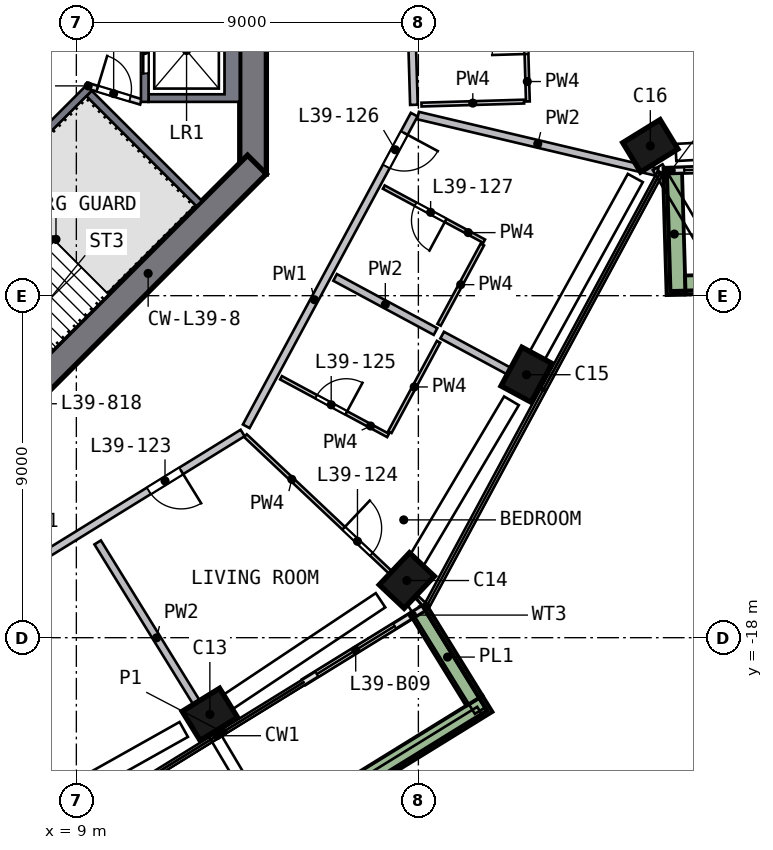
"""IFC4 building model, lengths in metres.
Left out: names, types, materials, properties, quantities, classifications, styles, units other than length and angle.
Written with IfcOpenShell. Run it as: python <this file> out.ifc"""

import sys

from ifc_helpers import new_model, si_unit, direction, frame, frame_2d, origin, origin_2d, place, context, subcontext, project, spatial, polyline, rectangle, outline, extrude, element, fill, save


model = new_model("IFC4")
c1 = context("Model", 3, precision=1e-05, world=origin(), true_north=direction((0.0, 1.0)))
c2 = subcontext(c1, "Body", "Model", "MODEL_VIEW")
j1 = project(units=[si_unit("LENGTHUNIT", "METRE"), si_unit("PLANEANGLEUNIT", "RADIAN")], contexts=[c1])
p1 = place(None, origin())
s1 = spatial("IfcSite", under=j1, at=p1, CompositionType="ELEMENT")
p2 = place(p1, origin())
s2 = spatial("IfcBuilding", under=s1, at=p2, CompositionType="ELEMENT")
p3 = place(p2, frame((0.0, 0.0, 162.0)))
s3 = spatial("IfcBuildingStorey", under=s2, at=p3, CompositionType="ELEMENT", Elevation=162.0)
p4 = place(p3, frame((12.398, -20.091, 0.0), z_axis=(0.09506304, 0.059775639, 0.993674943), x_axis=(0.845653201, 0.521786787, -0.112290748)))
e1 = element("IfcColumn", 1, at=p4, inside=s3, PredefinedType="COLUMN", context=c2, shape_type="SweptSolid", body=[
    extrude(rectangle(XDim=1.15, YDim=0.9, at=origin_2d()), origin(), (0.0, 0.0, 1.0), 3.21),
])
p5 = place(p3, frame((17.601, -16.598, 0.0), z_axis=(0.078230867, 0.084388982, 0.993357152), x_axis=(-0.681487218, -0.722727157, 0.115067924)))
e2 = element("IfcColumn", 2, at=p5, inside=s3, PredefinedType="COLUMN", context=c2, shape_type="SweptSolid", body=[
    extrude(rectangle(XDim=1.15, YDim=0.9, at=origin_2d()), origin(), (0.0, 0.0, 1.0), 3.211),
])
p6 = place(p3, frame((20.783, -11.2, 0.0), z_axis=(0.052474579, 0.09932145, 0.993670805), x_axis=(0.471622943, 0.874616696, -0.112327356)))
e3 = element("IfcColumn", 3, at=p6, inside=s3, PredefinedType="COLUMN", context=c2, shape_type="SweptSolid", body=[
    extrude(rectangle(XDim=1.15, YDim=0.9, at=origin_2d()), origin(), (0.0, 0.0, 1.0), 3.21),
])
p7 = place(p3, frame((24.075, -5.196, 0.0), z_axis=(0.023714632, 0.114620722, 0.993126229), x_axis=(-0.851746112, -0.517795924, 0.080099574)))
e4 = element("IfcColumn", 4, at=p7, inside=s3, PredefinedType="COLUMN", context=c2, shape_type="SweptSolid", body=[
    extrude(rectangle(XDim=1.15, YDim=0.9, at=origin_2d()), origin(), (0.0, 0.0, 1.0), 3.212),
])
p8 = place(p3, frame((13.65, -5.799, 0.0), z_axis=(0.0, 0.0, 1.0), x_axis=(0.0, 1.0, 0.0)))
e5 = element("IfcWall", 5, at=p8, inside=s3, PredefinedType="SHEAR", context=c2, shape_type="SweptSolid", body=[
    extrude(rectangle(XDim=11.598, YDim=0.7, at=frame_2d((5.799, 0.0))), origin(), (0.0, 0.0, 1.0), 3.5),
])
p9 = place(p8, frame((4.899, 0.0, 0.0)))
e6 = element("IfcOpeningElement", 6, at=p9, cuts=e5, PredefinedType="OPENING", context=c2, shape_type="SweptSolid", body=[
    extrude(rectangle(XDim=1.8, YDim=2.1, at=frame_2d((0.9, 1.05))), frame((0.0, 0.36, 0.0), z_axis=(0.0, -1.0, 0.0), x_axis=(1.0, 0.0, 0.0)), (0.0, 0.0, 1.0), 0.72),
])
p10 = place(p3, frame((5.552, -13.752, 0.0), z_axis=(0.0, 0.0, 1.0), x_axis=(0.707106781, 0.707106781, 0.0)))
e7 = element("IfcWall", 7, at=p10, inside=s3, PredefinedType="SHEAR", context=c2, shape_type="SweptSolid", body=[
    extrude(rectangle(XDim=11.598, YDim=0.7, at=frame_2d((5.799, 0.0))), origin(), (0.0, 0.0, 1.0), 3.5),
])
p11 = place(p10, frame((2.099, 0.0, 0.0)))
e8 = element("IfcOpeningElement", 8, at=p11, cuts=e7, PredefinedType="OPENING", context=c2, shape_type="SweptSolid", body=[
    extrude(rectangle(XDim=1.2, YDim=2.1, at=frame_2d((0.6, 1.05))), frame((0.0, 0.36, 0.0), z_axis=(0.0, -1.0, 0.0), x_axis=(1.0, 0.0, 0.0)), (0.0, 0.0, 1.0), 0.72),
])
p12 = place(p3, frame((14.989, -19.167, 0.0), z_axis=(0.0, 0.0, 1.0), x_axis=(0.851004729, 0.525158025, 0.0)))
e9 = element("IfcWall", 9, at=p12, inside=s3, PredefinedType="SOLIDWALL", context=c2, shape_type="SweptSolid", body=[
    extrude(rectangle(XDim=3.71, YDim=0.15, at=frame_2d((1.855, 0.0))), origin(), (0.0, 0.0, 1.0), 2.475),
])
p13 = place(p12, frame((0.4, 0.0, 0.0)))
e10 = element("IfcOpeningElement", 10, at=p13, cuts=e9, PredefinedType="OPENING", context=c2, shape_type="SweptSolid", body=[
    extrude(rectangle(XDim=2.4, YDim=2.4, at=frame_2d((1.2, 1.2))), frame((0.0, 0.085, 0.0), z_axis=(0.0, -1.0, 0.0), x_axis=(1.0, 0.0, 0.0)), (0.0, 0.0, 1.0), 0.17),
])
p14 = place(p3, frame((24.506, -5.709, 0.0), z_axis=(0.0, 0.0, 1.0), x_axis=(0.999571362, 0.029276149, 0.0)))
e11 = element("IfcWall", 11, at=p14, inside=s3, PredefinedType="SOLIDWALL", context=c2, shape_type="SweptSolid", body=[
    extrude(rectangle(XDim=2.393, YDim=0.15, at=frame_2d((1.197, 0.0))), origin(), (0.0, 0.0, 1.0), 2.475),
])
p15 = place(p14, frame((0.494, 0.0, 0.0)))
e12 = element("IfcOpeningElement", 12, at=p15, cuts=e11, PredefinedType="OPENING", context=c2, shape_type="SweptSolid", body=[
    extrude(rectangle(XDim=1.5, YDim=2.4, at=frame_2d((0.75, 1.2))), frame((0.0, 0.085, 0.0), z_axis=(0.0, -1.0, 0.0), x_axis=(1.0, 0.0, 0.0)), (0.0, 0.0, 1.0), 0.17),
])
p16 = place(p3, frame((8.142, -26.948, 0.0), z_axis=(0.0, 0.0, 1.0), x_axis=(0.85099, 0.525181892, 0.0)))
e13 = element("IfcWall", 13, at=p16, inside=s3, PredefinedType="SOLIDWALL", context=c2, shape_type="SweptSolid", body=[
    extrude(rectangle(XDim=13.723, YDim=0.5, at=frame_2d((6.862, 0.0))), origin(), (0.0, 0.0, 1.0), 0.7),
])
p17 = place(p3, frame((19.477, -19.659, 0.0), z_axis=(0.0, 0.0, 1.0), x_axis=(-0.525217448, 0.850968056, 0.0)))
e14 = element("IfcWall", 14, at=p17, inside=s3, PredefinedType="SOLIDWALL", context=c2, shape_type="SweptSolid", body=[
    extrude(rectangle(XDim=2.699, YDim=0.5, at=frame_2d((1.349, 0.0))), origin(), (0.0, 0.0, 1.0), 0.7),
])
p18 = place(p3, frame((24.688, -5.78, 0.0), z_axis=(0.0, 0.0, 1.0), x_axis=(0.029307097, -0.999570455, 0.0)))
e15 = element("IfcWall", 15, at=p18, inside=s3, PredefinedType="SOLIDWALL", context=c2, shape_type="SweptSolid", body=[
    extrude(rectangle(XDim=3.199, YDim=0.5, at=frame_2d((1.6, 0.0))), origin(), (0.0, 0.0, 1.0), 0.7),
])
p19 = place(p3, frame((25.025, -8.72, 0.0), z_axis=(0.0, 0.0, 1.0), x_axis=(0.999571841, 0.029259769, 0.0)))
e16 = element("IfcWall", 16, at=p19, inside=s3, PredefinedType="SOLIDWALL", context=c2, shape_type="SweptSolid", body=[
    extrude(rectangle(XDim=3.863, YDim=0.5, at=frame_2d((1.932, 0.0))), origin(), (0.0, 0.0, 1.0), 0.7),
])
p20 = place(p3, origin())
e17 = element("IfcWall", 17, at=p20, inside=s3, PredefinedType="SOLIDWALL", context=c2, shape_type="SweptSolid", body=[
    extrude(outline(polyline([(13.3, -3.9), (10.9, -3.9), (10.9, -3.7), (12.9, -3.7), (12.9, -1.4), (10.9, -1.4), (10.9, -1.2), (13.3, -1.2), (13.3, -3.9)])), origin(), (0.0, 0.0, 1.0), 3.19),
])
p21 = place(p3, frame((10.8, -1.2, 0.0), z_axis=(0.0, 0.0, 1.0), x_axis=(0.0, -1.0, 0.0)))
e18 = element("IfcWall", 18, at=p21, inside=s3, PredefinedType="SOLIDWALL", context=c2, shape_type="SweptSolid", body=[
    extrude(rectangle(XDim=2.7, YDim=0.2, at=frame_2d((1.35, 0.0))), origin(), (0.0, 0.0, 1.0), 3.19),
])
p22 = place(p21, frame((0.75, 0.0, 0.0)))
e19 = element("IfcOpeningElement", 19, at=p22, cuts=e18, PredefinedType="OPENING", context=c2, shape_type="SweptSolid", body=[
    extrude(rectangle(XDim=1.2, YDim=2.1, at=frame_2d((0.6, 1.05))), frame((0.0, 0.11, 0.0), z_axis=(0.0, -1.0, 0.0), x_axis=(1.0, 0.0, 0.0)), (0.0, 0.0, 1.0), 0.22),
])
p23 = place(p3, frame((9.334, -3.535, 0.0), z_axis=(0.0, 0.0, 1.0), x_axis=(-0.707106781, -0.707106781, 0.0)))
e20 = element("IfcWall", 20, at=p23, inside=s3, PredefinedType="SOLIDWALL", context=c2, shape_type="SweptSolid", body=[
    extrude(rectangle(XDim=8.2, YDim=0.2, at=frame_2d((4.1, 0.0))), origin(), (0.0, 0.0, 1.0), 3.19),
])
p24 = place(p23, frame((6.6, 0.0, 0.0)))
e21 = element("IfcOpeningElement", 21, at=p24, cuts=e20, PredefinedType="OPENING", context=c2, shape_type="SweptSolid", body=[
    extrude(rectangle(XDim=1.2, YDim=2.1, at=frame_2d((0.6, 1.05))), frame((0.0, 0.11, 0.0), z_axis=(0.0, -1.0, 0.0), x_axis=(1.0, 0.0, 0.0)), (0.0, 0.0, 1.0), 0.22),
])
p25 = place(p3, frame((9.334, -3.677, 0.0), z_axis=(0.0, 0.0, 1.0), x_axis=(0.707106781, -0.707106781, 0.0)))
e22 = element("IfcWall", 22, at=p25, inside=s3, PredefinedType="SOLIDWALL", context=c2, shape_type="SweptSolid", body=[
    extrude(rectangle(XDim=4.1, YDim=0.2, at=frame_2d((2.05, 0.0))), origin(), (0.0, 0.0, 1.0), 3.19),
])
p26 = place(p3, frame((9.263, -3.465, 0.0), z_axis=(0.0, 0.0, 1.0), x_axis=(0.957084567, -0.289808785, 0.0)))
e23 = element("IfcWall", 23, at=p26, inside=s3, PredefinedType="PARTITIONING", context=c2, shape_type="SweptSolid", body=[
    extrude(rectangle(XDim=1.501, YDim=0.15, at=frame_2d((0.75, 0.0))), origin(), (0.0, 0.0, 1.0), 3.19),
])
p27 = place(p26, frame((0.301, 0.0, 0.0)))
e24 = element("IfcOpeningElement", 24, at=p27, cuts=e23, PredefinedType="OPENING", context=c2, shape_type="SweptSolid", body=[
    extrude(rectangle(XDim=0.9, YDim=2.1, at=frame_2d((0.45, 1.05))), frame((0.0, 0.085, 0.0), z_axis=(0.0, -1.0, 0.0), x_axis=(1.0, 0.0, 0.0)), (0.0, 0.0, 1.0), 0.17),
])
p28 = place(p3, frame((13.375, -12.613, 0.0), z_axis=(0.0, 0.0, 1.0), x_axis=(-0.850995395, -0.52517315, 0.0)))
e25 = element("IfcWall", 25, at=p28, inside=s3, PredefinedType="SOLIDWALL", context=c2, shape_type="SweptSolid", body=[
    extrude(rectangle(XDim=9.316, YDim=0.2, at=frame_2d((4.658, 0.0))), origin(), (0.0, 0.0, 1.0), 3.19),
])
p29 = place(p28, frame((1.9, 0.0, 0.0)))
e26 = element("IfcOpeningElement", 26, at=p29, cuts=e25, PredefinedType="OPENING", context=c2, shape_type="SweptSolid", body=[
    extrude(rectangle(XDim=1.0, YDim=2.1, at=frame_2d((0.5, 1.05))), frame((0.0, 0.11, 0.0), z_axis=(0.0, -1.0, 0.0), x_axis=(1.0, 0.0, 0.0)), (0.0, 0.0, 1.0), 0.22),
])
p30 = place(p3, frame((17.89, -4.236, 0.0), z_axis=(0.0, 0.0, 1.0), x_axis=(-0.47438264, -0.880318755, 0.0)))
e27 = element("IfcWall", 27, at=p30, inside=s3, PredefinedType="SOLIDWALL", context=c2, shape_type="SweptSolid", body=[
    extrude(rectangle(XDim=9.317, YDim=0.2, at=frame_2d((4.658, 0.0))), origin(), (0.0, 0.0, 1.0), 3.19),
])
p31 = place(p30, frame((0.55, 0.0, 0.0)))
e28 = element("IfcOpeningElement", 28, at=p31, cuts=e27, PredefinedType="OPENING", context=c2, shape_type="SweptSolid", body=[
    extrude(rectangle(XDim=1.0, YDim=2.1, at=frame_2d((0.5, 1.05))), frame((0.0, 0.11, 0.0), z_axis=(0.0, -1.0, 0.0), x_axis=(1.0, 0.0, 0.0)), (0.0, 0.0, 1.0), 0.22),
])
p32 = place(p3, frame((17.883, -3.977, 0.0), z_axis=(0.0, 0.0, 1.0), x_axis=(-0.029297763, 0.999570728, 0.0)))
e29 = element("IfcWall", 29, at=p32, inside=s3, PredefinedType="SOLIDWALL", context=c2, shape_type="SweptSolid", body=[
    extrude(rectangle(XDim=3.4, YDim=0.2, at=frame_2d((1.7, 0.0))), origin(), (0.0, 0.0, 1.0), 3.19),
])
p33 = place(p3, frame((9.561, -15.493, 0.0), z_axis=(0.0, 0.0, 1.0), x_axis=(0.525190818, -0.850984492, 0.0)))
e30 = element("IfcWall", 30, at=p33, inside=s3, PredefinedType="SOLIDWALL", context=c2, shape_type="SweptSolid", body=[
    extrude(rectangle(XDim=5.903, YDim=0.2, at=frame_2d((2.951, 0.0))), origin(), (0.0, 0.0, 1.0), 3.19),
])
p34 = place(p3, frame((15.809, -8.519, 0.0), z_axis=(0.0, 0.0, 1.0), x_axis=(0.880296089, -0.4744247, 0.0)))
e31 = element("IfcWall", 31, at=p34, inside=s3, PredefinedType="SOLIDWALL", context=c2, shape_type="SweptSolid", body=[
    extrude(rectangle(XDim=3.002, YDim=0.2, at=frame_2d((1.501, 0.0))), origin(), (0.0, 0.0, 1.0), 3.19),
])
p35 = place(p3, frame((18.626, -10.037, 0.0), z_axis=(0.0, 0.0, 1.0), x_axis=(0.880285019, -0.47444524, 0.0)))
e32 = element("IfcWall", 32, at=p35, inside=s3, PredefinedType="SOLIDWALL", context=c2, shape_type="SweptSolid", body=[
    extrude(rectangle(XDim=2.95, YDim=0.2, at=frame_2d((1.475, 0.0))), origin(), (0.0, 0.0, 1.0), 3.19),
])
p36 = place(p3, frame((17.991, -4.26, 0.0), z_axis=(0.0, 0.0, 1.0), x_axis=(0.973098307, -0.230390289, 0.0)))
e33 = element("IfcWall", 33, at=p36, inside=s3, PredefinedType="SOLIDWALL", context=c2, shape_type="SweptSolid", body=[
    extrude(rectangle(XDim=6.476, YDim=0.2, at=frame_2d((3.238, 0.0))), origin(), (0.0, 0.0, 1.0), 3.19),
])
p37 = place(p3, frame((14.386, -11.16, 0.0), z_axis=(0.0, 0.0, 1.0), x_axis=(0.880304454, -0.474409178, 0.0)))
e34 = element("IfcWall", 34, at=p37, inside=s3, PredefinedType="PARTITIONING", context=c2, shape_type="SweptSolid", body=[
    extrude(rectangle(XDim=3.2, YDim=0.1, at=frame_2d((1.6, 0.0))), origin(), (0.0, 0.0, 1.0), 3.19),
])
p38 = place(p37, frame((1.05, 0.0, 0.0)))
e35 = element("IfcOpeningElement", 35, at=p38, cuts=e34, PredefinedType="OPENING", context=c2, shape_type="SweptSolid", body=[
    extrude(rectangle(XDim=0.9, YDim=2.1, at=frame_2d((0.45, 1.05))), frame((0.0, 0.06, 0.0), z_axis=(0.0, -1.0, 0.0), x_axis=(1.0, 0.0, 0.0)), (0.0, 0.0, 1.0), 0.12),
])
p39 = place(p3, frame((13.451, -12.684, 0.0), z_axis=(0.0, 0.0, 1.0), x_axis=(0.727520045, -0.686086427, 0.0)))
e36 = element("IfcWall", 36, at=p39, inside=s3, PredefinedType="PARTITIONING", context=c2, shape_type="SweptSolid", body=[
    extrude(rectangle(XDim=6.476, YDim=0.1, at=frame_2d((3.238, 0.0))), origin(), (0.0, 0.0, 1.0), 3.19),
])
p40 = place(p39, frame((3.55, 0.0, 0.0)))
e37 = element("IfcOpeningElement", 37, at=p40, cuts=e36, PredefinedType="OPENING", context=c2, shape_type="SweptSolid", body=[
    extrude(rectangle(XDim=1.0, YDim=2.1, at=frame_2d((0.5, 1.05))), frame((0.0, 0.06, 0.0), z_axis=(0.0, -1.0, 0.0), x_axis=(1.0, 0.0, 0.0)), (0.0, 0.0, 1.0), 0.12),
])
p41 = place(p3, frame((17.25, -12.59, 0.0), z_axis=(0.0, 0.0, 1.0), x_axis=(0.474347839, 0.880337508, 0.0)))
e38 = element("IfcWall", 38, at=p41, inside=s3, PredefinedType="PARTITIONING", context=c2, shape_type="SweptSolid", body=[
    extrude(rectangle(XDim=2.7, YDim=0.1, at=frame_2d((1.35, 0.0))), origin(), (0.0, 0.0, 1.0), 3.19),
])
p42 = place(p3, frame((19.731, -7.566, 0.0), z_axis=(0.0, 0.0, 1.0), x_axis=(-0.880319488, 0.474381279, 0.0)))
e39 = element("IfcWall", 39, at=p42, inside=s3, PredefinedType="PARTITIONING", context=c2, shape_type="SweptSolid", body=[
    extrude(rectangle(XDim=3.0, YDim=0.1, at=frame_2d((1.5, 0.0))), origin(), (0.0, 0.0, 1.0), 3.19),
])
p43 = place(p42, frame((1.15, 0.0, 0.0)))
e40 = element("IfcOpeningElement", 40, at=p43, cuts=e39, PredefinedType="OPENING", context=c2, shape_type="SweptSolid", body=[
    extrude(rectangle(XDim=0.9, YDim=2.1, at=frame_2d((0.45, 1.05))), frame((0.0, 0.06, 0.0), z_axis=(0.0, -1.0, 0.0), x_axis=(1.0, 0.0, 0.0)), (0.0, 0.0, 1.0), 0.12),
])
p44 = place(p3, frame((19.683, -7.654, 0.0), z_axis=(0.0, 0.0, 1.0), x_axis=(-0.474427351, -0.88029466, 0.0)))
e41 = element("IfcWall", 41, at=p44, inside=s3, PredefinedType="PARTITIONING", context=c2, shape_type="SweptSolid", body=[
    extrude(rectangle(XDim=2.4, YDim=0.1, at=frame_2d((1.2, 0.0))), origin(), (0.0, 0.0, 1.0), 3.19),
])
p45 = place(p3, frame((18.083, -3.972, 0.0), z_axis=(0.0, 0.0, 1.0), x_axis=(0.999568145, 0.029385766, 0.0)))
e42 = element("IfcWall", 42, at=p45, inside=s3, PredefinedType="PARTITIONING", context=c2, shape_type="SweptSolid", body=[
    extrude(rectangle(XDim=2.7, YDim=0.1, at=frame_2d((1.35, 0.0))), origin(), (0.0, 0.0, 1.0), 3.19),
])
p46 = place(p3, frame((20.881, -3.889, 0.0), z_axis=(0.0, 0.0, 1.0), x_axis=(-0.029298157, 0.999570717, 0.0)))
e43 = element("IfcWall", 43, at=p46, inside=s3, PredefinedType="PARTITIONING", context=c2, shape_type="SweptSolid", body=[
    extrude(rectangle(XDim=3.2, YDim=0.1, at=frame_2d((1.6, 0.0))), origin(), (0.0, 0.0, 1.0), 3.19),
])
p47 = place(p46, frame((1.25, 0.0, 0.0)))
e44 = element("IfcOpeningElement", 44, at=p47, cuts=e43, PredefinedType="OPENING", context=c2, shape_type="SweptSolid", body=[
    extrude(rectangle(XDim=0.9, YDim=2.1, at=frame_2d((0.45, 1.05))), frame((0.0, 0.06, 0.0), z_axis=(0.0, -1.0, 0.0), x_axis=(1.0, 0.0, 0.0)), (0.0, 0.0, 1.0), 0.12),
])
p48 = place(p13, origin())
e45 = element("IfcDoor", 45, at=p48, inside=s3, OperationType="SLIDING_TO_RIGHT", PredefinedType="DOOR", context=c2, shape_type="SweptSolid", body=[
    extrude(rectangle(XDim=2.4, YDim=2.4, at=frame_2d((1.2, 1.2))), frame((0.0, 0.025, 0.0), z_axis=(0.0, -1.0, 0.0), x_axis=(1.0, 0.0, 0.0)), (0.0, 0.0, 1.0), 0.05),
])
fill(e10, e45)
p49 = place(p15, origin())
e46 = element("IfcDoor", 46, at=p49, inside=s3, OperationType="SLIDING_TO_LEFT", PredefinedType="DOOR", context=c2, shape_type="SweptSolid", body=[
    extrude(rectangle(XDim=1.5, YDim=2.4, at=frame_2d((0.75, 1.2))), frame((0.0, 0.025, 0.0), z_axis=(0.0, -1.0, 0.0), x_axis=(1.0, 0.0, 0.0)), (0.0, 0.0, 1.0), 0.05),
])
fill(e12, e46)
p50 = place(p22, origin())
e47 = element("IfcDoor", 47, at=p50, inside=s3, OperationType="DOUBLE_DOOR_SLIDING", PredefinedType="DOOR", context=c2, shape_type="SweptSolid", body=[
    extrude(rectangle(XDim=1.2, YDim=2.1, at=frame_2d((0.6, 1.05))), frame((0.0, 0.025, 0.0), z_axis=(0.0, -1.0, 0.0), x_axis=(1.0, 0.0, 0.0)), (0.0, 0.0, 1.0), 0.05),
])
fill(e19, e47)
p51 = place(p27, origin())
e48 = element("IfcDoor", 48, at=p51, inside=s3, OperationType="SINGLE_SWING_LEFT", PredefinedType="DOOR", context=c2, shape_type="SweptSolid", body=[
    extrude(rectangle(XDim=0.9, YDim=2.1, at=frame_2d((0.45, 1.05))), frame((0.0, 0.025, 0.0), z_axis=(0.0, -1.0, 0.0), x_axis=(1.0, 0.0, 0.0)), (0.0, 0.0, 1.0), 0.05),
])
fill(e24, e48)
p52 = place(p29, origin())
e49 = element("IfcDoor", 49, at=p52, inside=s3, OperationType="SINGLE_SWING_LEFT", PredefinedType="DOOR", context=c2, shape_type="SweptSolid", body=[
    extrude(rectangle(XDim=1.0, YDim=2.1, at=frame_2d((0.5, 1.05))), frame((0.0, 0.025, 0.0), z_axis=(0.0, -1.0, 0.0), x_axis=(1.0, 0.0, 0.0)), (0.0, 0.0, 1.0), 0.05),
])
fill(e26, e49)
p53 = place(p40, origin())
e50 = element("IfcDoor", 50, at=p53, inside=s3, OperationType="SINGLE_SWING_LEFT", PredefinedType="DOOR", context=c2, shape_type="SweptSolid", body=[
    extrude(rectangle(XDim=1.0, YDim=2.1, at=frame_2d((0.5, 1.05))), frame((0.0, 0.025, 0.0), z_axis=(0.0, -1.0, 0.0), x_axis=(1.0, 0.0, 0.0)), (0.0, 0.0, 1.0), 0.05),
])
fill(e37, e50)
p54 = place(p38, origin())
e51 = element("IfcDoor", 51, at=p54, inside=s3, OperationType="SINGLE_SWING_RIGHT", PredefinedType="DOOR", context=c2, shape_type="SweptSolid", body=[
    extrude(rectangle(XDim=0.9, YDim=2.1, at=frame_2d((0.45, 1.05))), frame((0.0, 0.025, 0.0), z_axis=(0.0, -1.0, 0.0), x_axis=(1.0, 0.0, 0.0)), (0.0, 0.0, 1.0), 0.05),
])
fill(e35, e51)
p55 = place(p31, origin())
e52 = element("IfcDoor", 52, at=p55, inside=s3, OperationType="SINGLE_SWING_LEFT", PredefinedType="DOOR", context=c2, shape_type="SweptSolid", body=[
    extrude(rectangle(XDim=1.0, YDim=2.1, at=frame_2d((0.5, 1.05))), frame((0.0, 0.025, 0.0), z_axis=(0.0, -1.0, 0.0), x_axis=(1.0, 0.0, 0.0)), (0.0, 0.0, 1.0), 0.05),
])
fill(e28, e52)
p56 = place(p43, origin())
e53 = element("IfcDoor", 53, at=p56, inside=s3, OperationType="SINGLE_SWING_LEFT", PredefinedType="DOOR", context=c2, shape_type="SweptSolid", body=[
    extrude(rectangle(XDim=0.9, YDim=2.1, at=frame_2d((0.45, 1.05))), frame((0.0, 0.025, 0.0), z_axis=(0.0, -1.0, 0.0), x_axis=(1.0, 0.0, 0.0)), (0.0, 0.0, 1.0), 0.05),
])
fill(e40, e53)
p57 = place(p47, origin())
e54 = element("IfcDoor", 54, at=p57, inside=s3, OperationType="SINGLE_SWING_LEFT", PredefinedType="DOOR", context=c2, shape_type="SweptSolid", body=[
    extrude(rectangle(XDim=0.9, YDim=2.1, at=frame_2d((0.45, 1.05))), frame((0.0, 0.025, 0.0), z_axis=(0.0, -1.0, 0.0), x_axis=(1.0, 0.0, 0.0)), (0.0, 0.0, 1.0), 0.05),
])
fill(e44, e54)
save(model, sys.argv[1])
